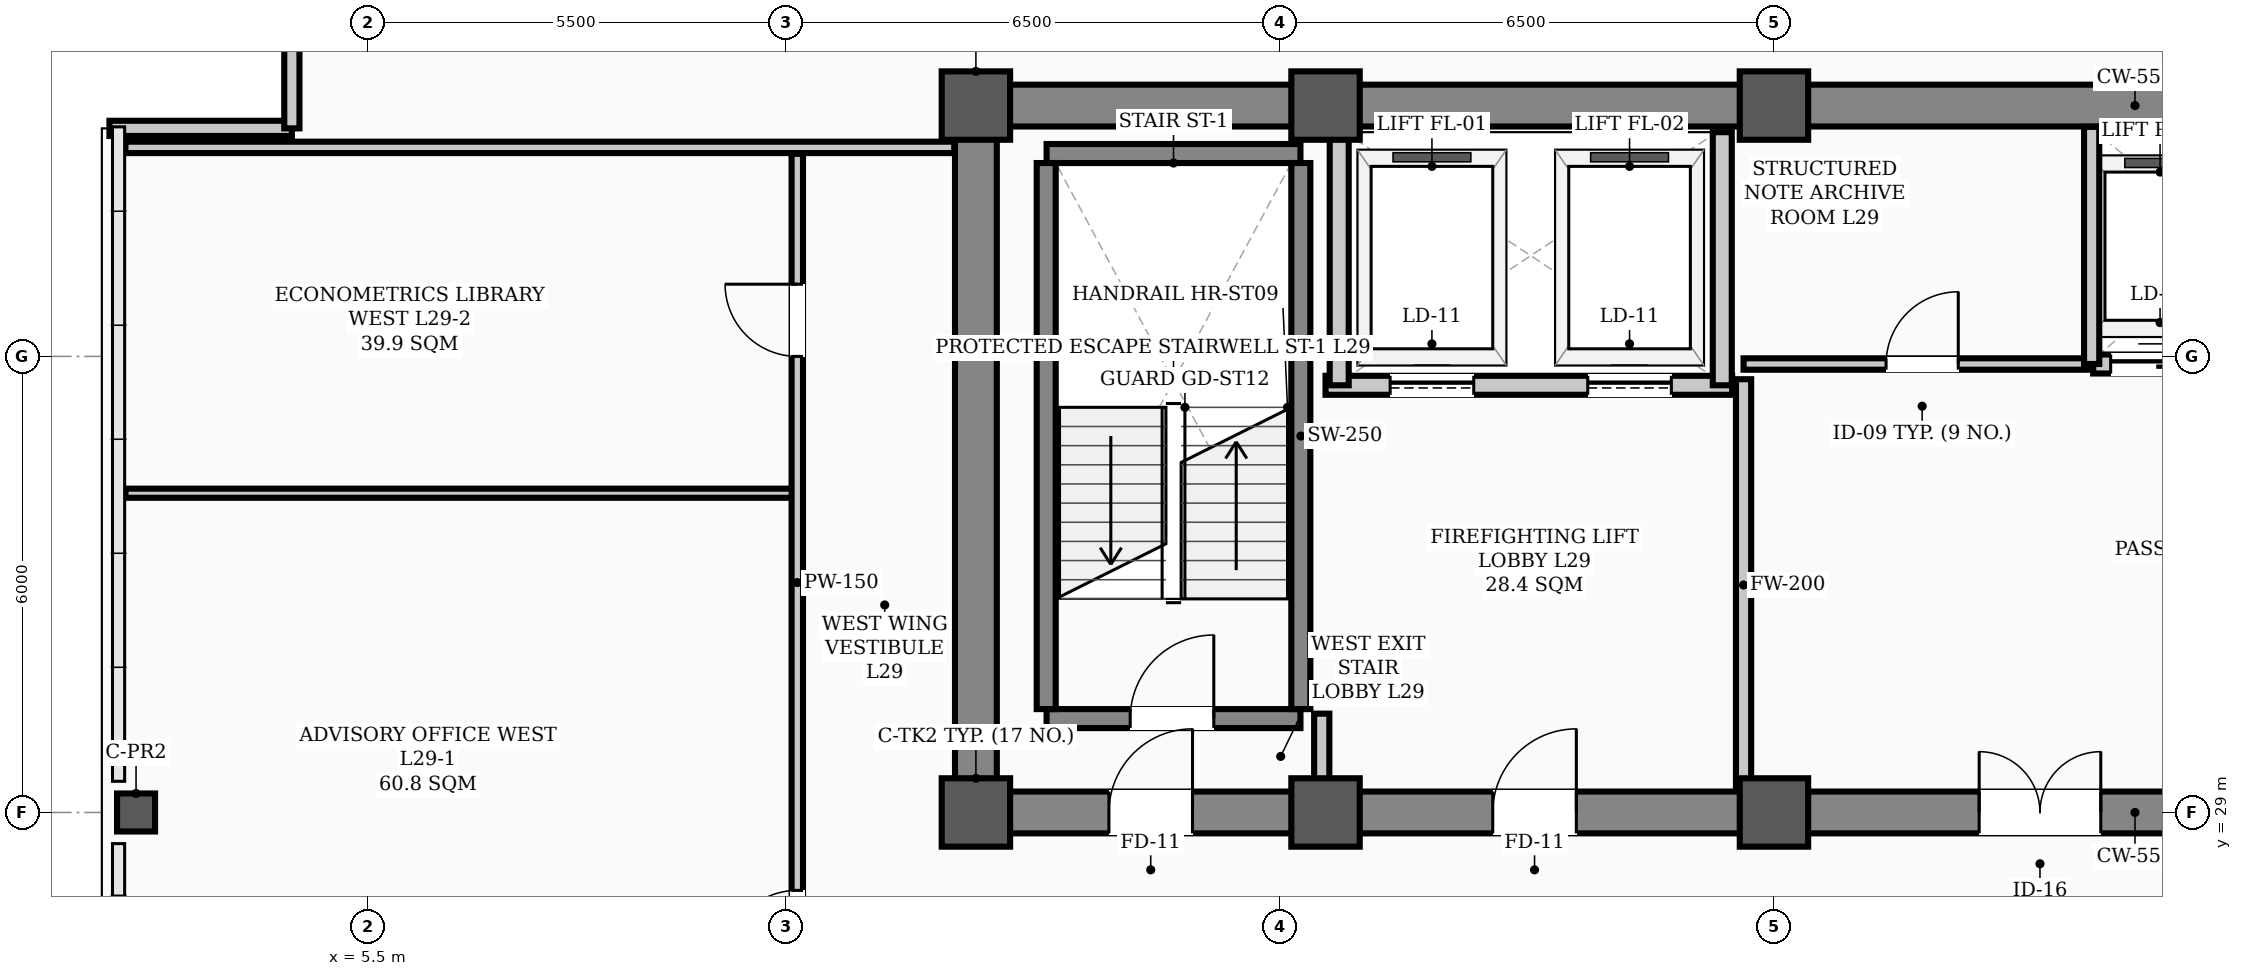
"""IFC4 building model, lengths in metres.
Left out: names, types, materials, properties, quantities, classifications, styles, units other than length and angle.
Written with IfcOpenShell. Run it as: python <this file> out.ifc"""

import sys

from ifc_helpers import new_model, si_unit, direction, frame, frame_2d, origin, origin_2d, place, context, subcontext, project, spatial, rectangle, hollow_rectangle, extrude, element, fill, save


model = new_model("IFC4")
c1 = context("Model", 3, precision=1e-05, world=origin(), true_north=direction((0.0, 1.0)))
c2 = subcontext(c1, "Body", "Model", "MODEL_VIEW")
j1 = project(units=[si_unit("LENGTHUNIT", "METRE"), si_unit("PLANEANGLEUNIT", "RADIAN")], contexts=[c1])
p1 = place(None, origin())
s1 = spatial("IfcSite", under=j1, at=p1, CompositionType="ELEMENT")
p2 = place(p1, origin())
s2 = spatial("IfcBuilding", under=s1, at=p2, CompositionType="ELEMENT")
p3 = place(p2, frame((0.0, 0.0, 118.8)))
s3 = spatial("IfcBuildingStorey", under=s2, at=p3, CompositionType="ELEMENT", Elevation=118.8)
for number, where, z_axis, x_axis in (
    (1, (13.5, 29.0, 0.0), (0.0, 0.0, 1.0), (1.0, 0.0, 0.0)),
    (2, (13.5, 38.3, 0.0), (0.0, 0.0, 1.0), (1.0, 0.0, 0.0)),
    (3, (18.1, 29.0, 0.0), (0.0, 0.0, 1.0), (1.0, 0.0, 0.0)),
    (4, (18.1, 38.3, 0.0), (0.0, 0.0, 1.0), (1.0, 0.0, 0.0)),
    (5, (24.0, 29.0, 0.0), (0.0, 0.0, 1.0), (1.0, 0.0, 0.0)),
    (6, (24.0, 38.3, 0.0), (0.0, 0.0, 1.0), (1.0, 0.0, 0.0)),
):
    element("IfcColumn", number, at=place(p3, frame(where, z_axis=z_axis, x_axis=x_axis)), inside=s3, PredefinedType="COLUMN", context=c2, shape_type="SweptSolid", body=[
        extrude(hollow_rectangle(XDim=0.9, YDim=0.9, WallThickness=0.035, InnerFilletRadius=0.017, OuterFilletRadius=0.052, at=origin_2d()), origin(), (0.0, 0.0, 1.0), 3.9),
    ])
p4 = place(p3, frame((2.45, 29.0, 0.0), z_axis=(0.0, 0.0, 1.0), x_axis=(1.0, 0.0, 0.0)))
e7 = element("IfcColumn", 7, at=p4, inside=s3, PredefinedType="COLUMN", context=c2, shape_type="SweptSolid", body=[
    extrude(hollow_rectangle(XDim=0.5, YDim=0.5, WallThickness=0.024, InnerFilletRadius=0.012, OuterFilletRadius=0.036, at=origin_2d()), origin(), (0.0, 0.0, 1.0), 3.9),
])
for number, where, z_axis, x_axis in (
    (8, (2.1, 38.0, 0.0), (0.0, 0.0, 1.0), (1.0, 0.0, 0.0)),
    (9, (4.5, 38.0, 0.0), (0.0, 0.0, 1.0), (0.0, 1.0, 0.0)),
):
    element("IfcWall", number, at=place(p3, frame(where, z_axis=z_axis, x_axis=x_axis)), inside=s3, PredefinedType="PARAPET", context=c2, shape_type="SweptSolid", body=[
        extrude(rectangle(XDim=2.4, YDim=0.2, at=frame_2d((1.2, 0.0))), origin(), (0.0, 0.0, 1.0), 1.2),
    ])
p5 = place(p3, frame((13.5, 29.0, 0.0), z_axis=(0.0, 0.0, 1.0), x_axis=(1.0, 0.0, 0.0)))
e10 = element("IfcWall", 10, at=p5, inside=s3, PredefinedType="SHEAR", context=c2, shape_type="SweptSolid", body=[
    extrude(rectangle(XDim=30.5, YDim=0.55, at=frame_2d((15.25, 0.0))), origin(), (0.0, 0.0, 1.0), 3.72),
])
p6 = place(p5, frame((1.75, 0.0, 0.0)))
e11 = element("IfcOpeningElement", 11, at=p6, cuts=e10, PredefinedType="OPENING", context=c2, shape_type="SweptSolid", body=[
    extrude(rectangle(XDim=1.1, YDim=2.08, at=frame_2d((0.55, 1.04))), frame((0.0, 0.285, 0.0), z_axis=(0.0, -1.0, 0.0), x_axis=(1.0, 0.0, 0.0)), (0.0, 0.0, 1.0), 0.57),
])
p7 = place(p5, frame((26.7, 0.0, 0.0)))
e12 = element("IfcOpeningElement", 12, at=p7, cuts=e10, PredefinedType="OPENING", context=c2, shape_type="SweptSolid", body=[
    extrude(rectangle(XDim=1.1, YDim=2.08, at=frame_2d((0.55, 1.04))), frame((0.0, 0.285, 0.0), z_axis=(0.0, -1.0, 0.0), x_axis=(1.0, 0.0, 0.0)), (0.0, 0.0, 1.0), 0.57),
])
p8 = place(p5, frame((6.8, 0.0, 0.0)))
e13 = element("IfcOpeningElement", 13, at=p8, cuts=e10, PredefinedType="OPENING", context=c2, shape_type="SweptSolid", body=[
    extrude(rectangle(XDim=1.1, YDim=2.08, at=frame_2d((0.55, 1.04))), frame((0.0, 0.285, 0.0), z_axis=(0.0, -1.0, 0.0), x_axis=(1.0, 0.0, 0.0)), (0.0, 0.0, 1.0), 0.57),
])
p9 = place(p5, frame((13.2, 0.0, 0.0)))
e14 = element("IfcOpeningElement", 14, at=p9, cuts=e10, PredefinedType="OPENING", context=c2, shape_type="SweptSolid", body=[
    extrude(rectangle(XDim=1.6, YDim=2.08, at=frame_2d((0.8, 1.04))), frame((0.0, 0.285, 0.0), z_axis=(0.0, -1.0, 0.0), x_axis=(1.0, 0.0, 0.0)), (0.0, 0.0, 1.0), 0.57),
])
p10 = place(p5, frame((19.5, 0.0, 0.0)))
e15 = element("IfcOpeningElement", 15, at=p10, cuts=e10, PredefinedType="OPENING", context=c2, shape_type="SweptSolid", body=[
    extrude(rectangle(XDim=0.9, YDim=2.08, at=frame_2d((0.45, 1.04))), frame((0.0, 0.285, 0.0), z_axis=(0.0, -1.0, 0.0), x_axis=(1.0, 0.0, 0.0)), (0.0, 0.0, 1.0), 0.57),
])
p11 = place(p5, frame((21.55, 0.0, 0.0)))
e16 = element("IfcOpeningElement", 16, at=p11, cuts=e10, PredefinedType="OPENING", context=c2, shape_type="SweptSolid", body=[
    extrude(rectangle(XDim=0.9, YDim=2.08, at=frame_2d((0.45, 1.04))), frame((0.0, 0.285, 0.0), z_axis=(0.0, -1.0, 0.0), x_axis=(1.0, 0.0, 0.0)), (0.0, 0.0, 1.0), 0.57),
])
p12 = place(p3, frame((13.5, 38.3, 0.0), z_axis=(0.0, 0.0, 1.0), x_axis=(1.0, 0.0, 0.0)))
e17 = element("IfcWall", 17, at=p12, inside=s3, PredefinedType="SHEAR", context=c2, shape_type="SweptSolid", body=[
    extrude(rectangle(XDim=30.5, YDim=0.55, at=frame_2d((15.25, 0.0))), origin(), (0.0, 0.0, 1.0), 3.72),
])
p13 = place(p3, frame((13.5, 29.35, 0.0), z_axis=(0.0, 0.0, 1.0), x_axis=(0.0, 1.0, 0.0)))
e18 = element("IfcWall", 18, at=p13, inside=s3, PredefinedType="SHEAR", context=c2, shape_type="SweptSolid", body=[
    extrude(rectangle(XDim=8.6, YDim=0.55, at=frame_2d((4.3, 0.0))), origin(), (0.0, 0.0, 1.0), 3.72),
])
p14 = place(p3, frame((14.43, 30.235, 0.0), z_axis=(0.0, 0.0, 1.0), x_axis=(1.0, 0.0, 0.0)))
e19 = element("IfcWall", 19, at=p14, inside=s3, PredefinedType="STANDARD", context=c2, shape_type="SweptSolid", body=[
    extrude(rectangle(XDim=3.34, YDim=0.25, at=frame_2d((1.67, 0.0))), origin(), (0.0, 0.0, 1.0), 3.72),
])
p15 = place(p14, frame((1.1, 0.0, 0.0)))
e20 = element("IfcOpeningElement", 20, at=p15, cuts=e19, PredefinedType="OPENING", context=c2, shape_type="SweptSolid", body=[
    extrude(rectangle(XDim=1.1, YDim=2.08, at=frame_2d((0.55, 1.04))), frame((0.0, 0.135, 0.0), z_axis=(0.0, -1.0, 0.0), x_axis=(1.0, 0.0, 0.0)), (0.0, 0.0, 1.0), 0.27),
])
p16 = place(p3, frame((14.43, 37.669, 0.0), z_axis=(0.0, 0.0, 1.0), x_axis=(1.0, 0.0, 0.0)))
e21 = element("IfcWall", 21, at=p16, inside=s3, PredefinedType="STANDARD", context=c2, shape_type="SweptSolid", body=[
    extrude(rectangle(XDim=3.34, YDim=0.25, at=frame_2d((1.67, 0.0))), origin(), (0.0, 0.0, 1.0), 3.72),
])
for number, where, z_axis, x_axis in (
    (22, (14.425, 30.36, 0.0), (0.0, 0.0, 1.0), (0.0, 1.0, 0.0)),
    (23, (17.775, 30.36, 0.0), (0.0, 0.0, 1.0), (0.0, 1.0, 0.0)),
):
    element("IfcWall", number, at=place(p3, frame(where, z_axis=z_axis, x_axis=x_axis)), inside=s3, PredefinedType="STANDARD", context=c2, shape_type="SweptSolid", body=[
        extrude(rectangle(XDim=7.184, YDim=0.25, at=frame_2d((3.592, 0.0))), origin(), (0.0, 0.0, 1.0), 3.72),
    ])
p17 = place(p3, frame((18.1, 34.62, 0.0), z_axis=(0.0, 0.0, 1.0), x_axis=(1.0, 0.0, 0.0)))
e24 = element("IfcWall", 24, at=p17, inside=s3, PredefinedType="STANDARD", context=c2, shape_type="SweptSolid", body=[
    extrude(rectangle(XDim=5.35, YDim=0.25, at=frame_2d((2.675, 0.0))), origin(), (0.0, 0.0, 1.0), 3.72),
])
p18 = place(p17, frame((0.85, 0.0, 0.0)))
e25 = element("IfcOpeningElement", 25, at=p18, cuts=e24, PredefinedType="OPENING", context=c2, shape_type="SweptSolid", body=[
    extrude(rectangle(XDim=1.1, YDim=2.08, at=frame_2d((0.55, 1.04))), frame((0.0, 0.135, 0.0), z_axis=(0.0, -1.0, 0.0), x_axis=(1.0, 0.0, 0.0)), (0.0, 0.0, 1.0), 0.27),
])
p19 = place(p17, frame((3.45, 0.0, 0.0)))
e26 = element("IfcOpeningElement", 26, at=p19, cuts=e24, PredefinedType="OPENING", context=c2, shape_type="SweptSolid", body=[
    extrude(rectangle(XDim=1.1, YDim=2.08, at=frame_2d((0.55, 1.04))), frame((0.0, 0.135, 0.0), z_axis=(0.0, -1.0, 0.0), x_axis=(1.0, 0.0, 0.0)), (0.0, 0.0, 1.0), 0.27),
])
for number, where, z_axis, x_axis in (
    (27, (18.28, 34.62, 0.0), (0.0, 0.0, 1.0), (0.0, 1.0, 0.0)),
    (28, (23.32, 34.62, 0.0), (0.0, 0.0, 1.0), (0.0, 1.0, 0.0)),
):
    element("IfcWall", number, at=place(p3, frame(where, z_axis=z_axis, x_axis=x_axis)), inside=s3, PredefinedType="STANDARD", context=c2, shape_type="SweptSolid", body=[
        extrude(rectangle(XDim=3.33, YDim=0.25, at=frame_2d((1.665, 0.0))), origin(), (0.0, 0.0, 1.0), 3.72),
    ])
p20 = place(p3, frame((28.2, 34.9, 0.0), z_axis=(0.0, 0.0, 1.0), x_axis=(1.0, 0.0, 0.0)))
e29 = element("IfcWall", 29, at=p20, inside=s3, PredefinedType="STANDARD", context=c2, shape_type="SweptSolid", body=[
    extrude(rectangle(XDim=3.55, YDim=0.25, at=frame_2d((1.775, 0.0))), origin(), (0.0, 0.0, 1.0), 3.72),
])
p21 = place(p20, frame((0.23, 0.0, 0.0)))
e30 = element("IfcOpeningElement", 30, at=p21, cuts=e29, PredefinedType="OPENING", context=c2, shape_type="SweptSolid", body=[
    extrude(rectangle(XDim=1.3, YDim=2.08, at=frame_2d((0.65, 1.04))), frame((0.0, 0.135, 0.0), z_axis=(0.0, -1.0, 0.0), x_axis=(1.0, 0.0, 0.0)), (0.0, 0.0, 1.0), 0.27),
])
p22 = place(p20, frame((2.03, 0.0, 0.0)))
e31 = element("IfcOpeningElement", 31, at=p22, cuts=e29, PredefinedType="OPENING", context=c2, shape_type="SweptSolid", body=[
    extrude(rectangle(XDim=1.3, YDim=2.08, at=frame_2d((0.65, 1.04))), frame((0.0, 0.135, 0.0), z_axis=(0.0, -1.0, 0.0), x_axis=(1.0, 0.0, 0.0)), (0.0, 0.0, 1.0), 0.27),
])
p23 = place(p3, frame((23.6, 34.9, 0.0), z_axis=(0.0, 0.0, 1.0), x_axis=(1.0, 0.0, 0.0)))
e32 = element("IfcWall", 32, at=p23, inside=s3, PredefinedType="PARTITIONING", context=c2, shape_type="SweptSolid", body=[
    extrude(rectangle(XDim=4.58, YDim=0.15, at=frame_2d((2.29, 0.0))), origin(), (0.0, 0.0, 1.0), 3.72),
])
p24 = place(p23, frame((1.875, 0.0, 0.0)))
e33 = element("IfcOpeningElement", 33, at=p24, cuts=e32, PredefinedType="OPENING", context=c2, shape_type="SweptSolid", body=[
    extrude(rectangle(XDim=0.95, YDim=2.08, at=frame_2d((0.475, 1.04))), frame((0.0, 0.085, 0.0), z_axis=(0.0, -1.0, 0.0), x_axis=(1.0, 0.0, 0.0)), (0.0, 0.0, 1.0), 0.17),
])
p25 = place(p3, frame((2.31, 37.75, 0.0), z_axis=(0.0, 0.0, 1.0), x_axis=(1.0, 0.0, 0.0)))
e34 = element("IfcWall", 34, at=p25, inside=s3, PredefinedType="PARTITIONING", context=c2, shape_type="SweptSolid", body=[
    extrude(rectangle(XDim=10.905, YDim=0.15, at=frame_2d((5.453, 0.0))), origin(), (0.0, 0.0, 1.0), 3.1),
])
p26 = place(p3, frame((2.31, 33.2, 0.0), z_axis=(0.0, 0.0, 1.0), x_axis=(1.0, 0.0, 0.0)))
e35 = element("IfcWall", 35, at=p26, inside=s3, PredefinedType="PARTITIONING", context=c2, shape_type="SweptSolid", body=[
    extrude(rectangle(XDim=8.84, YDim=0.12, at=frame_2d((4.42, 0.0))), origin(), (0.0, 0.0, 1.0), 3.72),
])
p27 = place(p3, frame((18.05, 29.285, 0.0), z_axis=(0.0, 0.0, 1.0), x_axis=(0.0, 1.0, 0.0)))
e36 = element("IfcWall", 36, at=p27, inside=s3, PredefinedType="STANDARD", context=c2, shape_type="SweptSolid", body=[
    extrude(rectangle(XDim=1.015, YDim=0.2, at=frame_2d((0.508, 0.0))), origin(), (0.0, 0.0, 1.0), 3.3),
])
p28 = place(p3, frame((23.6, 29.285, 0.0), z_axis=(0.0, 0.0, 1.0), x_axis=(0.0, 1.0, 0.0)))
e37 = element("IfcWall", 37, at=p28, inside=s3, PredefinedType="STANDARD", context=c2, shape_type="SweptSolid", body=[
    extrude(rectangle(XDim=5.415, YDim=0.2, at=frame_2d((2.708, 0.0))), origin(), (0.0, 0.0, 1.0), 3.1),
])
p29 = place(p3, frame((11.15, 26.385, 0.0), z_axis=(0.0, 0.0, 1.0), x_axis=(0.0, 1.0, 0.0)))
e38 = element("IfcWall", 38, at=p29, inside=s3, PredefinedType="PARTITIONING", context=c2, shape_type="SweptSolid", body=[
    extrude(rectangle(XDim=11.28, YDim=0.15, at=frame_2d((5.64, 0.0))), origin(), (0.0, 0.0, 1.0), 3.0),
])
p30 = place(p29, frame((0.64, 0.0, 0.0)))
e39 = element("IfcOpeningElement", 39, at=p30, cuts=e38, PredefinedType="OPENING", context=c2, shape_type="SweptSolid", body=[
    extrude(rectangle(XDim=0.95, YDim=2.08, at=frame_2d((0.475, 1.04))), frame((0.0, 0.085, 0.0), z_axis=(0.0, -1.0, 0.0), x_axis=(1.0, 0.0, 0.0)), (0.0, 0.0, 1.0), 0.17),
])
p31 = place(p29, frame((8.615, 0.0, 0.0)))
e40 = element("IfcOpeningElement", 40, at=p31, cuts=e38, PredefinedType="OPENING", context=c2, shape_type="SweptSolid", body=[
    extrude(rectangle(XDim=0.95, YDim=2.08, at=frame_2d((0.475, 1.04))), frame((0.0, 0.085, 0.0), z_axis=(0.0, -1.0, 0.0), x_axis=(1.0, 0.0, 0.0)), (0.0, 0.0, 1.0), 0.17),
])
p32 = place(p3, frame((28.18, 34.9, 0.0), z_axis=(0.0, 0.0, 1.0), x_axis=(0.0, 1.0, 0.0)))
e41 = element("IfcWall", 41, at=p32, inside=s3, PredefinedType="STANDARD", context=c2, shape_type="SweptSolid", body=[
    extrude(rectangle(XDim=3.12, YDim=0.2, at=frame_2d((1.56, 0.0))), origin(), (0.0, 0.0, 1.0), 3.72),
])
p33 = place(p15, origin())
e42 = element("IfcDoor", 42, at=p33, inside=s3, OperationType="SINGLE_SWING_RIGHT", PredefinedType="DOOR", context=c2, shape_type="SweptSolid", body=[
    extrude(rectangle(XDim=1.1, YDim=2.08, at=frame_2d((0.55, 1.04))), frame((0.0, 0.025, 0.0), z_axis=(0.0, -1.0, 0.0), x_axis=(1.0, 0.0, 0.0)), (0.0, 0.0, 1.0), 0.05),
])
fill(e20, e42)
p34 = place(p6, origin())
e43 = element("IfcDoor", 43, at=p34, inside=s3, OperationType="SINGLE_SWING_RIGHT", PredefinedType="DOOR", context=c2, shape_type="SweptSolid", body=[
    extrude(rectangle(XDim=1.1, YDim=2.08, at=frame_2d((0.55, 1.04))), frame((0.0, 0.025, 0.0), z_axis=(0.0, -1.0, 0.0), x_axis=(1.0, 0.0, 0.0)), (0.0, 0.0, 1.0), 0.05),
])
fill(e11, e43)
p35 = place(p8, origin())
e44 = element("IfcDoor", 44, at=p35, inside=s3, OperationType="SINGLE_SWING_RIGHT", PredefinedType="DOOR", context=c2, shape_type="SweptSolid", body=[
    extrude(rectangle(XDim=1.1, YDim=2.08, at=frame_2d((0.55, 1.04))), frame((0.0, 0.025, 0.0), z_axis=(0.0, -1.0, 0.0), x_axis=(1.0, 0.0, 0.0)), (0.0, 0.0, 1.0), 0.05),
])
fill(e13, e44)
p36 = place(p9, origin())
e45 = element("IfcDoor", 45, at=p36, inside=s3, OperationType="DOUBLE_DOOR_SINGLE_SWING", PredefinedType="DOOR", context=c2, shape_type="SweptSolid", body=[
    extrude(rectangle(XDim=1.6, YDim=2.08, at=frame_2d((0.8, 1.04))), frame((0.0, 0.025, 0.0), z_axis=(0.0, -1.0, 0.0), x_axis=(1.0, 0.0, 0.0)), (0.0, 0.0, 1.0), 0.05),
])
fill(e14, e45)
p37 = place(p24, origin())
e46 = element("IfcDoor", 46, at=p37, inside=s3, OperationType="SINGLE_SWING_RIGHT", PredefinedType="DOOR", context=c2, shape_type="SweptSolid", body=[
    extrude(rectangle(XDim=0.95, YDim=2.08, at=frame_2d((0.475, 1.04))), frame((0.0, 0.025, 0.0), z_axis=(0.0, -1.0, 0.0), x_axis=(1.0, 0.0, 0.0)), (0.0, 0.0, 1.0), 0.05),
])
fill(e33, e46)
p38 = place(p30, origin())
e47 = element("IfcDoor", 47, at=p38, inside=s3, OperationType="SINGLE_SWING_LEFT", PredefinedType="DOOR", context=c2, shape_type="SweptSolid", body=[
    extrude(rectangle(XDim=0.95, YDim=2.08, at=frame_2d((0.475, 1.04))), frame((0.0, 0.025, 0.0), z_axis=(0.0, -1.0, 0.0), x_axis=(1.0, 0.0, 0.0)), (0.0, 0.0, 1.0), 0.05),
])
fill(e39, e47)
p39 = place(p31, origin())
e48 = element("IfcDoor", 48, at=p39, inside=s3, OperationType="SINGLE_SWING_RIGHT", PredefinedType="DOOR", context=c2, shape_type="SweptSolid", body=[
    extrude(rectangle(XDim=0.95, YDim=2.08, at=frame_2d((0.475, 1.04))), frame((0.0, 0.025, 0.0), z_axis=(0.0, -1.0, 0.0), x_axis=(1.0, 0.0, 0.0)), (0.0, 0.0, 1.0), 0.05),
])
fill(e40, e48)
p40 = place(p18, origin())
e49 = element("IfcDoor", 49, at=p40, inside=s3, OperationType="SLIDING_TO_LEFT", PredefinedType="DOOR", context=c2, shape_type="SweptSolid", body=[
    extrude(rectangle(XDim=1.1, YDim=2.08, at=frame_2d((0.55, 1.04))), frame((0.0, 0.025, 0.0), z_axis=(0.0, -1.0, 0.0), x_axis=(1.0, 0.0, 0.0)), (0.0, 0.0, 1.0), 0.05),
])
fill(e25, e49)
p41 = place(p19, origin())
e50 = element("IfcDoor", 50, at=p41, inside=s3, OperationType="SLIDING_TO_LEFT", PredefinedType="DOOR", context=c2, shape_type="SweptSolid", body=[
    extrude(rectangle(XDim=1.1, YDim=2.08, at=frame_2d((0.55, 1.04))), frame((0.0, 0.025, 0.0), z_axis=(0.0, -1.0, 0.0), x_axis=(1.0, 0.0, 0.0)), (0.0, 0.0, 1.0), 0.05),
])
fill(e26, e50)
p42 = place(p21, origin())
e51 = element("IfcDoor", 51, at=p42, inside=s3, OperationType="DOUBLE_DOOR_SLIDING", PredefinedType="DOOR", context=c2, shape_type="SweptSolid", body=[
    extrude(rectangle(XDim=1.3, YDim=2.08, at=frame_2d((0.65, 1.04))), frame((0.0, 0.025, 0.0), z_axis=(0.0, -1.0, 0.0), x_axis=(1.0, 0.0, 0.0)), (0.0, 0.0, 1.0), 0.05),
])
fill(e30, e51)
save(model, sys.argv[1])
